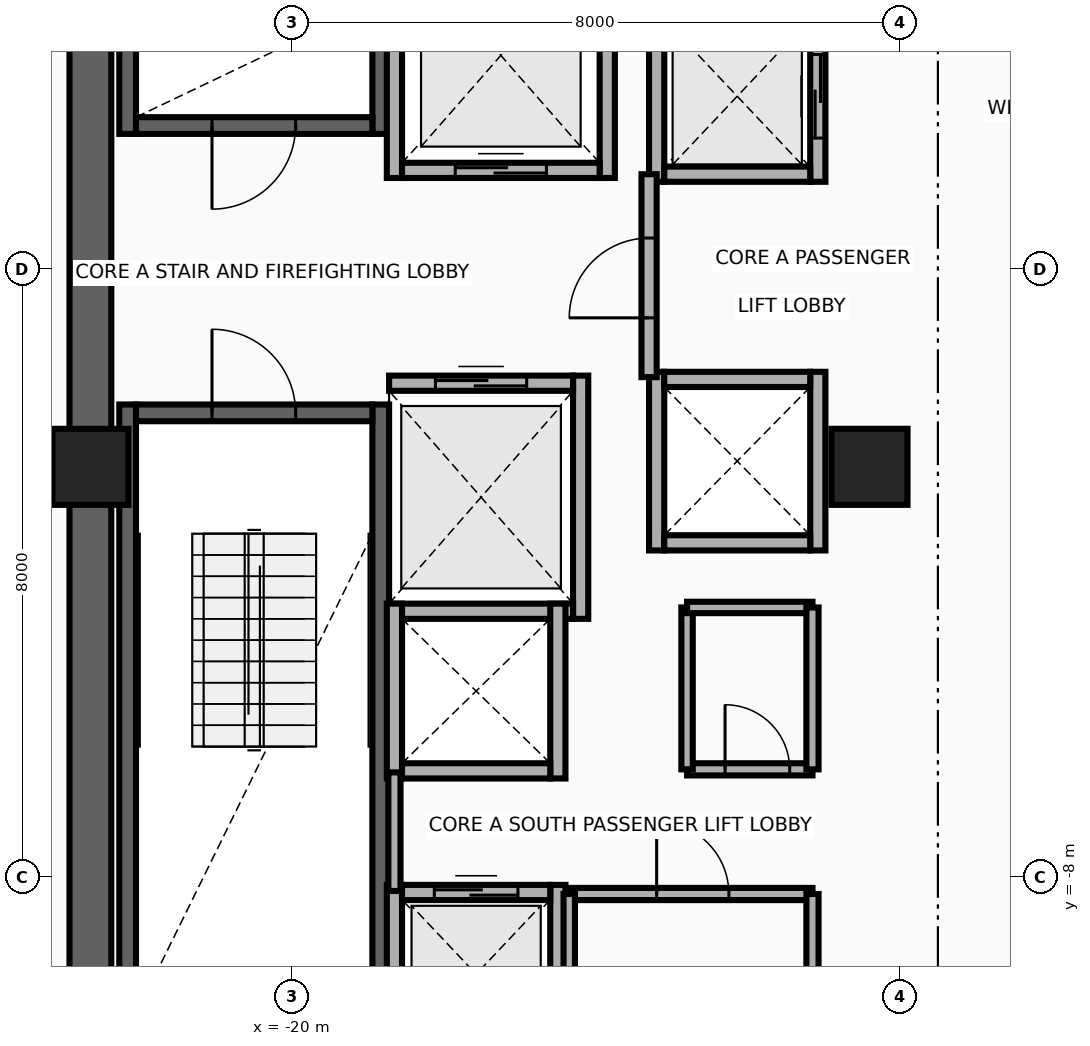
"""IFC4 building model, lengths in metres.
Left out: names, types, materials, properties, quantities, classifications, styles, units other than length and angle.
Written with IfcOpenShell. Run it as: python <this file> out.ifc"""

import sys

from ifc_helpers import new_model, si_unit, direction, frame, frame_2d, origin, origin_2d, place, context, subcontext, project, spatial, rectangle, extrude, source, transform, mapped, element, fill, save


model = new_model("IFC4")
c1 = context("Model", 3, precision=1e-05, world=origin(), true_north=direction((0.0, 1.0)))
c2 = subcontext(c1, "Body", "Model", "MODEL_VIEW")
j1 = project(units=[si_unit("LENGTHUNIT", "METRE"), si_unit("PLANEANGLEUNIT", "RADIAN")], contexts=[c1])
p1 = place(None, origin())
s1 = spatial("IfcSite", under=j1, at=p1, CompositionType="ELEMENT")
p2 = place(p1, origin())
s2 = spatial("IfcBuilding", under=s1, at=p2, CompositionType="ELEMENT")
p3 = place(p2, frame((0.0, 0.0, 180.5)))
s3 = spatial("IfcBuildingStorey", under=s2, at=p3, CompositionType="ELEMENT", Elevation=180.5)
for number, where, z_axis, x_axis in (
    (1, (-22.16, 1.78, 0.0), (0.0, 0.0, 1.0), (0.0, 1.0, 0.0)),
    (2, (-18.83, 1.78, 0.0), (0.0, 0.0, 1.0), (0.0, 1.0, 0.0)),
):
    element("IfcWall", number, at=place(p3, frame(where, z_axis=z_axis, x_axis=x_axis)), inside=s3, PredefinedType="SHEAR", context=c2, shape_type="SweptSolid", body=[
        extrude(rectangle(XDim=8.745, YDim=0.22, at=frame_2d((4.373, 0.0))), origin(), (0.0, 0.0, 1.0), 3.63),
    ])
p4 = place(p3, frame((-22.05, 1.89, 0.0), z_axis=(0.0, 0.0, 1.0), x_axis=(1.0, 0.0, 0.0)))
e3 = element("IfcWall", 3, at=p4, inside=s3, PredefinedType="SHEAR", context=c2, shape_type="SweptSolid", body=[
    extrude(rectangle(XDim=3.11, YDim=0.22, at=frame_2d((1.555, 0.0))), origin(), (0.0, 0.0, 1.0), 3.63),
])
p5 = place(p4, frame((1.0, 0.0, 0.0)))
e4 = element("IfcOpeningElement", 4, at=p5, cuts=e3, PredefinedType="OPENING", context=c2, shape_type="SweptSolid", body=[
    extrude(rectangle(XDim=1.1, YDim=2.15, at=frame_2d((0.55, 1.075))), frame((0.0, 0.125, 0.0), z_axis=(0.0, -1.0, 0.0), x_axis=(1.0, 0.0, 0.0)), (0.0, 0.0, 1.0), 0.25),
])
for number, where, z_axis, x_axis in (
    (5, (-22.16, -10.525, 0.0), (0.0, 0.0, 1.0), (0.0, 1.0, 0.0)),
    (6, (-18.83, -10.525, 0.0), (0.0, 0.0, 1.0), (0.0, 1.0, 0.0)),
):
    element("IfcWall", number, at=place(p3, frame(where, z_axis=z_axis, x_axis=x_axis)), inside=s3, PredefinedType="SHEAR", context=c2, shape_type="SweptSolid", body=[
        extrude(rectangle(XDim=8.745, YDim=0.22, at=frame_2d((4.373, 0.0))), origin(), (0.0, 0.0, 1.0), 3.63),
    ])
p6 = place(p3, frame((-22.05, -1.89, 0.0), z_axis=(0.0, 0.0, 1.0), x_axis=(1.0, 0.0, 0.0)))
e7 = element("IfcWall", 7, at=p6, inside=s3, PredefinedType="SHEAR", context=c2, shape_type="SweptSolid", body=[
    extrude(rectangle(XDim=3.11, YDim=0.22, at=frame_2d((1.555, 0.0))), origin(), (0.0, 0.0, 1.0), 3.63),
])
p7 = place(p6, frame((1.0, 0.0, 0.0)))
e8 = element("IfcOpeningElement", 8, at=p7, cuts=e7, PredefinedType="OPENING", context=c2, shape_type="SweptSolid", body=[
    extrude(rectangle(XDim=1.1, YDim=2.15, at=frame_2d((0.55, 1.075))), frame((0.0, 0.125, 0.0), z_axis=(0.0, -1.0, 0.0), x_axis=(1.0, 0.0, 0.0)), (0.0, 0.0, 1.0), 0.25),
])
p8 = place(p3, frame((-22.65, -11.075, 0.0), z_axis=(0.0, 0.0, 1.0), x_axis=(0.0, 1.0, 0.0)))
e9 = element("IfcWall", 9, at=p8, inside=s3, PredefinedType="SHEAR", context=c2, shape_type="SweptSolid", body=[
    extrude(rectangle(XDim=22.15, YDim=0.55, at=frame_2d((11.075, 0.0))), origin(), (0.0, 0.0, 1.0), 3.63),
])
m1 = source(origin(), c2, "Body", "SweptSolid", [
    extrude(rectangle(XDim=1.0, YDim=1.0, at=origin_2d()), origin(), (0.0, 0.0, 1.0), 3.95),
])
for number, where, z_axis, x_axis in (
    (10, (-22.65, -2.6, 0.0), (0.0, 0.0, 1.0), (1.0, 0.0, 0.0)),
    (11, (-12.4, -2.6, 0.0), (0.0, 0.0, 1.0), (1.0, 0.0, 0.0)),
):
    element("IfcColumn", number, at=place(p3, frame(where, z_axis=z_axis, x_axis=x_axis)), inside=s3, PredefinedType="COLUMN", context=c2, shape_type="MappedRepresentation", body=[
        mapped(m1, transform((0.0, 0.0, 0.0), x_axis=(1.0, 0.0, 0.0), y_axis=(0.0, 1.0, 0.0), z_axis=(0.0, 0.0, 1.0), scale=1.0)),
    ])
for number, where, z_axis, x_axis in (
    (12, (-18.65, 1.2, 0.0), (0.0, 0.0, 1.0), (0.0, 1.0, 0.0)),
    (13, (-15.85, 1.2, 0.0), (0.0, 0.0, 1.0), (0.0, 1.0, 0.0)),
):
    element("IfcWall", number, at=place(p3, frame(where, z_axis=z_axis, x_axis=x_axis)), inside=s3, PredefinedType="MOVABLE", context=c2, shape_type="SweptSolid", body=[
        extrude(rectangle(XDim=3.225, YDim=0.2, at=frame_2d((1.613, 0.0))), origin(), (0.0, 0.0, 1.0), 3.63),
    ])
p9 = place(p3, frame((-18.55, 1.3, 0.0), z_axis=(0.0, 0.0, 1.0), x_axis=(1.0, 0.0, 0.0)))
e14 = element("IfcWall", 14, at=p9, inside=s3, PredefinedType="MOVABLE", context=c2, shape_type="SweptSolid", body=[
    extrude(rectangle(XDim=2.6, YDim=0.2, at=frame_2d((1.3, 0.0))), origin(), (0.0, 0.0, 1.0), 3.63),
])
p10 = place(p9, frame((0.7, 0.0, 0.0)))
e15 = element("IfcOpeningElement", 15, at=p10, cuts=e14, PredefinedType="OPENING", context=c2, shape_type="SweptSolid", body=[
    extrude(rectangle(XDim=1.2, YDim=2.1, at=frame_2d((0.6, 1.05))), frame((0.0, 0.115, 0.0), z_axis=(0.0, -1.0, 0.0), x_axis=(1.0, 0.0, 0.0)), (0.0, 0.0, 1.0), 0.23),
])
p11 = place(p3, frame((-16.2, -4.6, 0.0), z_axis=(0.0, 0.0, 1.0), x_axis=(0.0, 1.0, 0.0)))
e16 = element("IfcWall", 16, at=p11, inside=s3, PredefinedType="MOVABLE", context=c2, shape_type="SweptSolid", body=[
    extrude(rectangle(XDim=3.2, YDim=0.2, at=frame_2d((1.6, 0.0))), origin(), (0.0, 0.0, 1.0), 3.63),
])
p12 = place(p3, frame((-18.72, -4.5, 0.0), z_axis=(0.0, 0.0, 1.0), x_axis=(1.0, 0.0, 0.0)))
e17 = element("IfcWall", 17, at=p12, inside=s3, PredefinedType="MOVABLE", context=c2, shape_type="SweptSolid", body=[
    extrude(rectangle(XDim=2.42, YDim=0.2, at=frame_2d((1.21, 0.0))), origin(), (0.0, 0.0, 1.0), 3.63),
])
p13 = place(p3, frame((-18.72, -1.5, 0.0), z_axis=(0.0, 0.0, 1.0), x_axis=(1.0, 0.0, 0.0)))
e18 = element("IfcWall", 18, at=p13, inside=s3, PredefinedType="MOVABLE", context=c2, shape_type="SweptSolid", body=[
    extrude(rectangle(XDim=2.42, YDim=0.2, at=frame_2d((1.21, 0.0))), origin(), (0.0, 0.0, 1.0), 3.63),
])
p14 = place(p13, frame((0.61, 0.0, 0.0)))
e19 = element("IfcOpeningElement", 19, at=p14, cuts=e18, PredefinedType="OPENING", context=c2, shape_type="SweptSolid", body=[
    extrude(rectangle(XDim=1.2, YDim=2.1, at=frame_2d((0.6, 1.05))), frame((0.0, 0.115, 0.0), z_axis=(0.0, -1.0, 0.0), x_axis=(1.0, 0.0, 0.0)), (0.0, 0.0, 1.0), 0.23),
])
for number, where, z_axis, x_axis in (
    (20, (-18.65, -10.45, 0.0), (0.0, 0.0, 1.0), (0.0, 1.0, 0.0)),
    (21, (-16.5, -10.45, 0.0), (0.0, 0.0, 1.0), (0.0, 1.0, 0.0)),
):
    element("IfcWall", number, at=place(p3, frame(where, z_axis=z_axis, x_axis=x_axis)), inside=s3, PredefinedType="MOVABLE", context=c2, shape_type="SweptSolid", body=[
        extrude(rectangle(XDim=2.35, YDim=0.2, at=frame_2d((1.175, 0.0))), origin(), (0.0, 0.0, 1.0), 2.665),
    ])
p15 = place(p3, frame((-18.55, -8.2, 0.0), z_axis=(0.0, 0.0, 1.0), x_axis=(1.0, 0.0, 0.0)))
e22 = element("IfcWall", 22, at=p15, inside=s3, PredefinedType="MOVABLE", context=c2, shape_type="SweptSolid", body=[
    extrude(rectangle(XDim=1.95, YDim=0.2, at=frame_2d((0.975, 0.0))), origin(), (0.0, 0.0, 1.0), 3.63),
])
p16 = place(p15, frame((0.425, 0.0, 0.0)))
e23 = element("IfcOpeningElement", 23, at=p16, cuts=e22, PredefinedType="OPENING", context=c2, shape_type="SweptSolid", body=[
    extrude(rectangle(XDim=1.1, YDim=2.1, at=frame_2d((0.55, 1.05))), frame((0.0, 0.115, 0.0), z_axis=(0.0, -1.0, 0.0), x_axis=(1.0, 0.0, 0.0)), (0.0, 0.0, 1.0), 0.23),
])
p17 = place(p3, frame((-15.2, 1.15, 0.0), z_axis=(0.0, 0.0, 1.0), x_axis=(0.0, 1.0, 0.0)))
e24 = element("IfcWall", 24, at=p17, inside=s3, PredefinedType="MOVABLE", context=c2, shape_type="SweptSolid", body=[
    extrude(rectangle(XDim=2.25, YDim=0.2, at=frame_2d((1.125, 0.0))), origin(), (0.0, 0.0, 1.0), 3.63),
])
p18 = place(p3, frame((-13.08, 1.15, 0.0), z_axis=(0.0, 0.0, 1.0), x_axis=(0.0, 1.0, 0.0)))
e25 = element("IfcWall", 25, at=p18, inside=s3, PredefinedType="MOVABLE", context=c2, shape_type="SweptSolid", body=[
    extrude(rectangle(XDim=2.25, YDim=0.2, at=frame_2d((1.125, 0.0))), origin(), (0.0, 0.0, 1.0), 3.63),
])
p19 = place(p18, frame((0.575, 0.0, 0.0)))
e26 = element("IfcOpeningElement", 26, at=p19, cuts=e25, PredefinedType="OPENING", context=c2, shape_type="SweptSolid", body=[
    extrude(rectangle(XDim=1.1, YDim=2.1, at=frame_2d((0.55, 1.05))), frame((0.0, 0.115, 0.0), z_axis=(0.0, -1.0, 0.0), x_axis=(1.0, 0.0, 0.0)), (0.0, 0.0, 1.0), 0.23),
])
p20 = place(p3, frame((-15.1, 1.25, 0.0), z_axis=(0.0, 0.0, 1.0), x_axis=(1.0, 0.0, 0.0)))
e27 = element("IfcWall", 27, at=p20, inside=s3, PredefinedType="MOVABLE", context=c2, shape_type="SweptSolid", body=[
    extrude(rectangle(XDim=1.92, YDim=0.2, at=frame_2d((0.96, 0.0))), origin(), (0.0, 0.0, 1.0), 3.63),
])
for number, where, z_axis, x_axis in (
    (28, (-18.65, -6.7, 0.0), (0.0, 0.0, 1.0), (0.0, 1.0, 0.0)),
    (29, (-16.5, -6.7, 0.0), (0.0, 0.0, 1.0), (0.0, 1.0, 0.0)),
):
    element("IfcWall", number, at=place(p3, frame(where, z_axis=z_axis, x_axis=x_axis)), inside=s3, PredefinedType="MOVABLE", context=c2, shape_type="SweptSolid", body=[
        extrude(rectangle(XDim=2.3, YDim=0.2, at=frame_2d((1.15, 0.0))), origin(), (0.0, 0.0, 1.0), 3.63),
    ])
p21 = place(p3, frame((-18.55, -6.6, 0.0), z_axis=(0.0, 0.0, 1.0), x_axis=(1.0, 0.0, 0.0)))
e30 = element("IfcWall", 30, at=p21, inside=s3, PredefinedType="MOVABLE", context=c2, shape_type="SweptSolid", body=[
    extrude(rectangle(XDim=1.95, YDim=0.2, at=frame_2d((0.975, 0.0))), origin(), (0.0, 0.0, 1.0), 3.63),
])
for number, where, z_axis, x_axis in (
    (31, (-15.2, -3.7, 0.0), (0.0, 0.0, 1.0), (0.0, 1.0, 0.0)),
    (32, (-13.08, -3.7, 0.0), (0.0, 0.0, 1.0), (0.0, 1.0, 0.0)),
):
    element("IfcWall", number, at=place(p3, frame(where, z_axis=z_axis, x_axis=x_axis)), inside=s3, PredefinedType="MOVABLE", context=c2, shape_type="SweptSolid", body=[
        extrude(rectangle(XDim=2.35, YDim=0.2, at=frame_2d((1.175, 0.0))), origin(), (0.0, 0.0, 1.0), 3.63),
    ])
for number, where, z_axis, x_axis in (
    (33, (-15.1, -3.6, 0.0), (0.0, 0.0, 1.0), (1.0, 0.0, 0.0)),
    (34, (-15.1, -1.45, 0.0), (0.0, 0.0, 1.0), (1.0, 0.0, 0.0)),
):
    element("IfcWall", number, at=place(p3, frame(where, z_axis=z_axis, x_axis=x_axis)), inside=s3, PredefinedType="MOVABLE", context=c2, shape_type="SweptSolid", body=[
        extrude(rectangle(XDim=1.92, YDim=0.2, at=frame_2d((0.96, 0.0))), origin(), (0.0, 0.0, 1.0), 3.63),
    ])
p22 = place(p3, frame((-15.3, -1.42, 0.0), z_axis=(0.0, 0.0, 1.0), x_axis=(0.0, 1.0, 0.0)))
e35 = element("IfcWall", 35, at=p22, inside=s3, PredefinedType="PARTITIONING", context=c2, shape_type="SweptSolid", body=[
    extrude(rectangle(XDim=2.67, YDim=0.2, at=frame_2d((1.335, 0.0))), origin(), (0.0, 0.0, 1.0), 3.63),
])
p23 = place(p22, frame((0.78, 0.0, 0.0)))
e36 = element("IfcOpeningElement", 36, at=p23, cuts=e35, PredefinedType="OPENING", context=c2, shape_type="SweptSolid", body=[
    extrude(rectangle(XDim=1.05, YDim=2.15, at=frame_2d((0.525, 1.075))), frame((0.0, 0.115, 0.0), z_axis=(0.0, -1.0, 0.0), x_axis=(1.0, 0.0, 0.0)), (0.0, 0.0, 1.0), 0.23),
])
p24 = place(p3, frame((-18.65, -8.18, 0.0), z_axis=(0.0, 0.0, 1.0), x_axis=(0.0, 1.0, 0.0)))
e37 = element("IfcWall", 37, at=p24, inside=s3, PredefinedType="PARTITIONING", context=c2, shape_type="SweptSolid", body=[
    extrude(rectangle(XDim=1.56, YDim=0.16, at=frame_2d((0.78, 0.0))), origin(), (0.0, 0.0, 1.0), 3.63),
])
p25 = place(p3, frame((-16.35, -8.22, 0.0), z_axis=(0.0, 0.0, 1.0), x_axis=(1.0, 0.0, 0.0)))
e38 = element("IfcWall", 38, at=p25, inside=s3, PredefinedType="PARTITIONING", context=c2, shape_type="SweptSolid", body=[
    extrude(rectangle(XDim=3.2, YDim=0.16, at=frame_2d((1.6, 0.0))), origin(), (0.0, 0.0, 1.0), 3.63),
])
p26 = place(p25, frame((1.15, 0.0, 0.0)))
e39 = element("IfcOpeningElement", 39, at=p26, cuts=e38, PredefinedType="OPENING", context=c2, shape_type="SweptSolid", body=[
    extrude(rectangle(XDim=0.95, YDim=2.15, at=frame_2d((0.475, 1.075))), frame((0.0, 0.095, 0.0), z_axis=(0.0, -1.0, 0.0), x_axis=(1.0, 0.0, 0.0)), (0.0, 0.0, 1.0), 0.19),
])
p27 = place(p3, frame((-16.35, -10.35, 0.0), z_axis=(0.0, 0.0, 1.0), x_axis=(0.0, 1.0, 0.0)))
e40 = element("IfcWall", 40, at=p27, inside=s3, PredefinedType="PARTITIONING", context=c2, shape_type="SweptSolid", body=[
    extrude(rectangle(XDim=2.13, YDim=0.15, at=frame_2d((1.065, 0.0))), origin(), (0.0, 0.0, 1.0), 3.63),
])
p28 = place(p3, frame((-13.15, -10.35, 0.0), z_axis=(0.0, 0.0, 1.0), x_axis=(0.0, 1.0, 0.0)))
e41 = element("IfcWall", 41, at=p28, inside=s3, PredefinedType="PARTITIONING", context=c2, shape_type="SweptSolid", body=[
    extrude(rectangle(XDim=2.13, YDim=0.16, at=frame_2d((1.065, 0.0))), origin(), (0.0, 0.0, 1.0), 3.63),
])
p29 = place(p3, frame((-14.8, -6.58, 0.0), z_axis=(0.0, 0.0, 1.0), x_axis=(1.0, 0.0, 0.0)))
e42 = element("IfcWall", 42, at=p29, inside=s3, PredefinedType="PARTITIONING", context=c2, shape_type="SweptSolid", body=[
    extrude(rectangle(XDim=1.65, YDim=0.16, at=frame_2d((0.825, 0.0))), origin(), (0.0, 0.0, 1.0), 3.63),
])
p30 = place(p29, frame((0.5, 0.0, 0.0)))
e43 = element("IfcOpeningElement", 43, at=p30, cuts=e42, PredefinedType="OPENING", context=c2, shape_type="SweptSolid", body=[
    extrude(rectangle(XDim=0.85, YDim=2.05, at=frame_2d((0.425, 1.025))), frame((0.0, 0.095, 0.0), z_axis=(0.0, -1.0, 0.0), x_axis=(1.0, 0.0, 0.0)), (0.0, 0.0, 1.0), 0.19),
])
p31 = place(p3, frame((-14.8, -6.58, 0.0), z_axis=(0.0, 0.0, 1.0), x_axis=(0.0, 1.0, 0.0)))
e44 = element("IfcWall", 44, at=p31, inside=s3, PredefinedType="PARTITIONING", context=c2, shape_type="SweptSolid", body=[
    extrude(rectangle(XDim=2.13, YDim=0.15, at=frame_2d((1.065, 0.0))), origin(), (0.0, 0.0, 1.0), 3.63),
])
p32 = place(p3, frame((-14.8, -4.45, 0.0), z_axis=(0.0, 0.0, 1.0), x_axis=(1.0, 0.0, 0.0)))
e45 = element("IfcWall", 45, at=p32, inside=s3, PredefinedType="PARTITIONING", context=c2, shape_type="SweptSolid", body=[
    extrude(rectangle(XDim=1.65, YDim=0.15, at=frame_2d((0.825, 0.0))), origin(), (0.0, 0.0, 1.0), 3.63),
])
p33 = place(p3, frame((-13.15, -6.58, 0.0), z_axis=(0.0, 0.0, 1.0), x_axis=(0.0, 1.0, 0.0)))
e46 = element("IfcWall", 46, at=p33, inside=s3, PredefinedType="PARTITIONING", context=c2, shape_type="SweptSolid", body=[
    extrude(rectangle(XDim=2.13, YDim=0.16, at=frame_2d((1.065, 0.0))), origin(), (0.0, 0.0, 1.0), 3.63),
])
p34 = place(p10, origin())
e47 = element("IfcDoor", 47, at=p34, inside=s3, OperationType="DOUBLE_DOOR_SLIDING", PredefinedType="DOOR", context=c2, shape_type="SweptSolid", body=[
    extrude(rectangle(XDim=1.2, YDim=2.1, at=frame_2d((0.6, 1.05))), frame((0.0, 0.025, 0.0), z_axis=(0.0, -1.0, 0.0), x_axis=(1.0, 0.0, 0.0)), (0.0, 0.0, 1.0), 0.05),
])
fill(e15, e47)
p35 = place(p14, origin())
e48 = element("IfcDoor", 48, at=p35, inside=s3, OperationType="DOUBLE_DOOR_SLIDING", PredefinedType="DOOR", context=c2, shape_type="SweptSolid", body=[
    extrude(rectangle(XDim=1.2, YDim=2.1, at=frame_2d((0.6, 1.05))), frame((0.0, 0.025, 0.0), z_axis=(0.0, -1.0, 0.0), x_axis=(1.0, 0.0, 0.0)), (0.0, 0.0, 1.0), 0.05),
])
fill(e19, e48)
p36 = place(p16, origin())
e49 = element("IfcDoor", 49, at=p36, inside=s3, OperationType="DOUBLE_DOOR_SLIDING", PredefinedType="DOOR", context=c2, shape_type="SweptSolid", body=[
    extrude(rectangle(XDim=1.1, YDim=2.1, at=frame_2d((0.55, 1.05))), frame((0.0, 0.025, 0.0), z_axis=(0.0, -1.0, 0.0), x_axis=(1.0, 0.0, 0.0)), (0.0, 0.0, 1.0), 0.05),
])
fill(e23, e49)
p37 = place(p19, origin())
e50 = element("IfcDoor", 50, at=p37, inside=s3, OperationType="DOUBLE_DOOR_SLIDING", PredefinedType="DOOR", context=c2, shape_type="SweptSolid", body=[
    extrude(rectangle(XDim=1.1, YDim=2.1, at=frame_2d((0.55, 1.05))), frame((0.0, 0.025, 0.0), z_axis=(0.0, -1.0, 0.0), x_axis=(1.0, 0.0, 0.0)), (0.0, 0.0, 1.0), 0.05),
])
fill(e26, e50)
p38 = place(p23, origin())
e51 = element("IfcDoor", 51, at=p38, inside=s3, OperationType="SINGLE_SWING_RIGHT", PredefinedType="DOOR", context=c2, shape_type="SweptSolid", body=[
    extrude(rectangle(XDim=1.05, YDim=2.15, at=frame_2d((0.525, 1.075))), frame((0.0, 0.025, 0.0), z_axis=(0.0, -1.0, 0.0), x_axis=(1.0, 0.0, 0.0)), (0.0, 0.0, 1.0), 0.05),
])
fill(e36, e51)
p39 = place(p5, frame((1.1, 0.0, 0.0), z_axis=(0.0, 0.0, 1.0), x_axis=(-1.0, 0.0, 0.0)))
e52 = element("IfcDoor", 52, at=p39, inside=s3, OperationType="SINGLE_SWING_LEFT", PredefinedType="DOOR", context=c2, shape_type="SweptSolid", body=[
    extrude(rectangle(XDim=1.1, YDim=2.15, at=frame_2d((0.55, 1.075))), frame((0.0, 0.025, 0.0), z_axis=(0.0, -1.0, 0.0), x_axis=(1.0, 0.0, 0.0)), (0.0, 0.0, 1.0), 0.05),
])
fill(e4, e52)
p40 = place(p7, origin())
e53 = element("IfcDoor", 53, at=p40, inside=s3, OperationType="SINGLE_SWING_RIGHT", PredefinedType="DOOR", context=c2, shape_type="SweptSolid", body=[
    extrude(rectangle(XDim=1.1, YDim=2.15, at=frame_2d((0.55, 1.075))), frame((0.0, 0.025, 0.0), z_axis=(0.0, -1.0, 0.0), x_axis=(1.0, 0.0, 0.0)), (0.0, 0.0, 1.0), 0.05),
])
fill(e8, e53)
p41 = place(p26, origin())
e54 = element("IfcDoor", 54, at=p41, inside=s3, OperationType="SINGLE_SWING_RIGHT", PredefinedType="DOOR", context=c2, shape_type="SweptSolid", body=[
    extrude(rectangle(XDim=0.95, YDim=2.15, at=frame_2d((0.475, 1.075))), frame((0.0, 0.025, 0.0), z_axis=(0.0, -1.0, 0.0), x_axis=(1.0, 0.0, 0.0)), (0.0, 0.0, 1.0), 0.05),
])
fill(e39, e54)
p42 = place(p30, origin())
e55 = element("IfcDoor", 55, at=p42, inside=s3, OperationType="SINGLE_SWING_LEFT", PredefinedType="DOOR", context=c2, shape_type="SweptSolid", body=[
    extrude(rectangle(XDim=0.85, YDim=2.05, at=frame_2d((0.425, 1.025))), frame((0.0, 0.025, 0.0), z_axis=(0.0, -1.0, 0.0), x_axis=(1.0, 0.0, 0.0)), (0.0, 0.0, 1.0), 0.05),
])
fill(e43, e55)
save(model, sys.argv[1])
